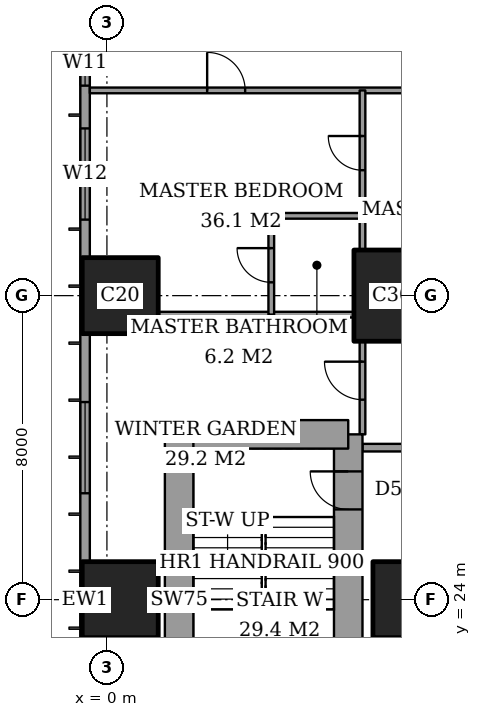
"""IFC4 building model, lengths in metres.
Left out: names, types, materials, properties, quantities, classifications, styles, units other than length and angle.
Written with IfcOpenShell. Run it as: python <this file> out.ifc"""

import sys

from ifc_helpers import new_model, si_unit, direction, frame, frame_2d, origin, origin_2d, place, context, subcontext, project, spatial, rectangle, extrude, element, fill, save


model = new_model("IFC4")
c1 = context("Model", 3, precision=1e-05, world=origin(), true_north=direction((0.0, 1.0)))
c2 = subcontext(c1, "Body", "Model", "MODEL_VIEW")
j1 = project(units=[si_unit("LENGTHUNIT", "METRE"), si_unit("PLANEANGLEUNIT", "RADIAN")], contexts=[c1])
p1 = place(None, origin())
s1 = spatial("IfcSite", under=j1, at=p1, CompositionType="ELEMENT")
p2 = place(p1, origin())
s2 = spatial("IfcBuilding", under=s1, at=p2, CompositionType="ELEMENT")
p3 = place(p2, frame((0.0, 0.0, 157.4)))
s3 = spatial("IfcBuildingStorey", under=s2, at=p3, CompositionType="ELEMENT", Elevation=157.4)
for number, where, z_axis, x_axis in (
    (1, (0.35, 24.0, 0.0), (0.0, 0.0, 1.0), (1.0, 0.0, 0.0)),
    (2, (0.35, 32.0, 0.0), (0.0, 0.0, 1.0), (1.0, 0.0, 0.0)),
    (3, (8.0, 24.0, 0.0), (0.0, 0.0, 1.0), (1.0, 0.0, 0.0)),
):
    element("IfcColumn", number, at=place(p3, frame(where, z_axis=z_axis, x_axis=x_axis)), inside=s3, PredefinedType="COLUMN", context=c2, shape_type="SweptSolid", body=[
        extrude(rectangle(XDim=2.0, YDim=2.0, at=origin_2d()), origin(), (0.0, 0.0, 1.0), 3.6),
    ])
p4 = place(p3, frame((8.0, 32.0, 0.0), z_axis=(0.0, 0.0, 1.0), x_axis=(1.0, 0.0, 0.0)))
e4 = element("IfcColumn", 4, at=p4, inside=s3, PredefinedType="COLUMN", context=c2, shape_type="SweptSolid", body=[
    extrude(rectangle(XDim=3.0, YDim=2.4, at=origin_2d()), origin(), (0.0, 0.0, 1.0), 3.6),
])
p5 = place(p3, frame((6.35, 19.65, 0.0), z_axis=(0.0, 0.0, 1.0), x_axis=(0.0, 1.0, 0.0)))
e5 = element("IfcWall", 5, at=p5, inside=s3, PredefinedType="SHEAR", context=c2, shape_type="SweptSolid", body=[
    extrude(rectangle(XDim=8.7, YDim=0.75, at=frame_2d((4.35, 0.0))), origin(), (0.0, 0.0, 1.0), 3.6),
])
p6 = place(p5, frame((6.725, 0.0, 0.0)))
e6 = element("IfcOpeningElement", 6, at=p6, cuts=e5, PredefinedType="OPENING", context=c2, shape_type="SweptSolid", body=[
    extrude(rectangle(XDim=1.0, YDim=2.1, at=frame_2d((0.5, 1.05))), frame((0.0, 0.385, 0.0), z_axis=(0.0, -1.0, 0.0), x_axis=(1.0, 0.0, 0.0)), (0.0, 0.0, 1.0), 0.77),
])
p7 = place(p3, frame((6.35, 28.35, 0.0), z_axis=(0.0, 0.0, 1.0), x_axis=(-1.0, 0.0, 0.0)))
e7 = element("IfcWall", 7, at=p7, inside=s3, PredefinedType="SHEAR", context=c2, shape_type="SweptSolid", body=[
    extrude(rectangle(XDim=4.45, YDim=0.75, at=frame_2d((2.225, 0.0))), origin(), (0.0, 0.0, 1.0), 3.6),
])
p8 = place(p3, frame((1.9, 28.35, 0.0), z_axis=(0.0, 0.0, 1.0), x_axis=(0.0, -1.0, 0.0)))
e8 = element("IfcWall", 8, at=p8, inside=s3, PredefinedType="SHEAR", context=c2, shape_type="SweptSolid", body=[
    extrude(rectangle(XDim=8.7, YDim=0.75, at=frame_2d((4.35, 0.0))), origin(), (0.0, 0.0, 1.0), 3.6),
])
p9 = place(p3, frame((-0.575, 44.825, 0.0), z_axis=(0.0, 0.0, 1.0), x_axis=(0.0, -1.0, 0.0)))
e9 = element("IfcWall", 9, at=p9, inside=s3, PredefinedType="SOLIDWALL", context=c2, shape_type="SweptSolid", body=[
    extrude(rectangle(XDim=41.65, YDim=0.25, at=frame_2d((20.825, 0.0))), origin(), (0.0, 0.0, 1.0), 3.6),
])
p10 = place(p9, frame((0.775, 0.0, 0.4)))
e10 = element("IfcOpeningElement", 10, at=p10, cuts=e9, PredefinedType="OPENING", context=c2, shape_type="SweptSolid", body=[
    extrude(rectangle(XDim=2.4, YDim=2.2, at=frame_2d((1.2, 1.1))), frame((0.0, 0.135, 0.0), z_axis=(0.0, -1.0, 0.0), x_axis=(1.0, 0.0, 0.0)), (0.0, 0.0, 1.0), 0.27),
])
p11 = place(p9, frame((6.1, 0.0, 0.4)))
e11 = element("IfcOpeningElement", 11, at=p11, cuts=e9, PredefinedType="OPENING", context=c2, shape_type="SweptSolid", body=[
    extrude(rectangle(XDim=1.2, YDim=2.2, at=frame_2d((0.6, 1.1))), frame((0.0, 0.135, 0.0), z_axis=(0.0, -1.0, 0.0), x_axis=(1.0, 0.0, 0.0)), (0.0, 0.0, 1.0), 0.27),
])
p12 = place(p9, frame((8.425, 0.0, 0.4)))
e12 = element("IfcOpeningElement", 12, at=p12, cuts=e9, PredefinedType="OPENING", context=c2, shape_type="SweptSolid", body=[
    extrude(rectangle(XDim=2.4, YDim=2.2, at=frame_2d((1.2, 1.1))), frame((0.0, 0.135, 0.0), z_axis=(0.0, -1.0, 0.0), x_axis=(1.0, 0.0, 0.0)), (0.0, 0.0, 1.0), 0.27),
])
p13 = place(p9, frame((15.625, 0.0, 0.4)))
e13 = element("IfcOpeningElement", 13, at=p13, cuts=e9, PredefinedType="OPENING", context=c2, shape_type="SweptSolid", body=[
    extrude(rectangle(XDim=2.4, YDim=2.2, at=frame_2d((1.2, 1.1))), frame((0.0, 0.135, 0.0), z_axis=(0.0, -1.0, 0.0), x_axis=(1.0, 0.0, 0.0)), (0.0, 0.0, 1.0), 0.27),
])
p14 = place(p9, frame((23.625, 0.0, 0.4)))
e14 = element("IfcOpeningElement", 14, at=p14, cuts=e9, PredefinedType="OPENING", context=c2, shape_type="SweptSolid", body=[
    extrude(rectangle(XDim=2.4, YDim=2.2, at=frame_2d((1.2, 1.1))), frame((0.0, 0.135, 0.0), z_axis=(0.0, -1.0, 0.0), x_axis=(1.0, 0.0, 0.0)), (0.0, 0.0, 1.0), 0.27),
])
p15 = place(p9, frame((30.825, 0.0, 0.4)))
e15 = element("IfcOpeningElement", 15, at=p15, cuts=e9, PredefinedType="OPENING", context=c2, shape_type="SweptSolid", body=[
    extrude(rectangle(XDim=2.4, YDim=2.2, at=frame_2d((1.2, 1.1))), frame((0.0, 0.135, 0.0), z_axis=(0.0, -1.0, 0.0), x_axis=(1.0, 0.0, 0.0)), (0.0, 0.0, 1.0), 0.27),
])
p16 = place(p9, frame((34.5, 0.0, 0.4)))
e16 = element("IfcOpeningElement", 16, at=p16, cuts=e9, PredefinedType="OPENING", context=c2, shape_type="SweptSolid", body=[
    extrude(rectangle(XDim=1.2, YDim=2.2, at=frame_2d((0.6, 1.1))), frame((0.0, 0.135, 0.0), z_axis=(0.0, -1.0, 0.0), x_axis=(1.0, 0.0, 0.0)), (0.0, 0.0, 1.0), 0.27),
])
p17 = place(p9, frame((38.475, 0.0, 0.4)))
e17 = element("IfcOpeningElement", 17, at=p17, cuts=e9, PredefinedType="OPENING", context=c2, shape_type="SweptSolid", body=[
    extrude(rectangle(XDim=2.4, YDim=2.2, at=frame_2d((1.2, 1.1))), frame((0.0, 0.135, 0.0), z_axis=(0.0, -1.0, 0.0), x_axis=(1.0, 0.0, 0.0)), (0.0, 0.0, 1.0), 0.27),
])
p18 = place(p3, frame((6.725, 28.0, 0.0), z_axis=(0.0, 0.0, 1.0), x_axis=(1.0, 0.0, 0.0)))
e18 = element("IfcWall", 18, at=p18, inside=s3, PredefinedType="PARTITIONING", context=c2, shape_type="SweptSolid", body=[
    extrude(rectangle(XDim=17.275, YDim=0.2, at=frame_2d((8.637, 0.0))), origin(), (0.0, 0.0, 1.0), 3.35),
])
p19 = place(p18, frame((6.675, 0.0, 0.0)))
e19 = element("IfcOpeningElement", 19, at=p19, cuts=e18, PredefinedType="OPENING", context=c2, shape_type="SweptSolid", body=[
    extrude(rectangle(XDim=1.2, YDim=2.4, at=frame_2d((0.6, 1.2))), frame((0.0, 0.11, 0.0), z_axis=(0.0, -1.0, 0.0), x_axis=(1.0, 0.0, 0.0)), (0.0, 0.0, 1.0), 0.22),
])
p20 = place(p3, frame((1.35, 31.5, 0.0), z_axis=(0.0, 0.0, 1.0), x_axis=(1.0, 0.0, 0.0)))
e20 = element("IfcWall", 20, at=p20, inside=s3, PredefinedType="PARTITIONING", context=c2, shape_type="SweptSolid", body=[
    extrude(rectangle(XDim=5.15, YDim=0.15, at=frame_2d((2.575, 0.0))), origin(), (0.0, 0.0, 1.0), 3.35),
])
p21 = place(p3, frame((4.325, 34.1, 0.0), z_axis=(0.0, 0.0, 1.0), x_axis=(1.0, 0.0, 0.0)))
e21 = element("IfcWall", 21, at=p21, inside=s3, PredefinedType="PARTITIONING", context=c2, shape_type="SweptSolid", body=[
    extrude(rectangle(XDim=2.4, YDim=0.15, at=frame_2d((1.2, 0.0))), origin(), (0.0, 0.0, 1.0), 3.35),
])
p22 = place(p3, frame((-0.45, 37.4, 0.0), z_axis=(0.0, 0.0, 1.0), x_axis=(1.0, 0.0, 0.0)))
e22 = element("IfcWall", 22, at=p22, inside=s3, PredefinedType="PARTITIONING", context=c2, shape_type="SweptSolid", body=[
    extrude(rectangle(XDim=25.011, YDim=0.15, at=frame_2d((12.505, 0.0))), origin(), (0.0, 0.0, 1.0), 3.35),
])
p23 = place(p22, frame((13.25, 0.0, 0.0)))
e23 = element("IfcOpeningElement", 23, at=p23, cuts=e22, PredefinedType="OPENING", context=c2, shape_type="SweptSolid", body=[
    extrude(rectangle(XDim=1.0, YDim=2.1, at=frame_2d((0.5, 1.05))), frame((0.0, 0.085, 0.0), z_axis=(0.0, -1.0, 0.0), x_axis=(1.0, 0.0, 0.0)), (0.0, 0.0, 1.0), 0.17),
])
p24 = place(p22, frame((3.087, 0.0, 0.0)))
e24 = element("IfcOpeningElement", 24, at=p24, cuts=e22, PredefinedType="OPENING", context=c2, shape_type="SweptSolid", body=[
    extrude(rectangle(XDim=1.0, YDim=2.1, at=frame_2d((0.5, 1.05))), frame((0.0, 0.085, 0.0), z_axis=(0.0, -1.0, 0.0), x_axis=(1.0, 0.0, 0.0)), (0.0, 0.0, 1.0), 0.17),
])
p25 = place(p22, frame((11.05, 0.0, 0.0)))
e25 = element("IfcOpeningElement", 25, at=p25, cuts=e22, PredefinedType="OPENING", context=c2, shape_type="SweptSolid", body=[
    extrude(rectangle(XDim=1.0, YDim=2.1, at=frame_2d((0.5, 1.05))), frame((0.0, 0.085, 0.0), z_axis=(0.0, -1.0, 0.0), x_axis=(1.0, 0.0, 0.0)), (0.0, 0.0, 1.0), 0.17),
])
p26 = place(p22, frame((16.15, 0.0, 0.0)))
e26 = element("IfcOpeningElement", 26, at=p26, cuts=e22, PredefinedType="OPENING", context=c2, shape_type="SweptSolid", body=[
    extrude(rectangle(XDim=1.0, YDim=2.1, at=frame_2d((0.5, 1.05))), frame((0.0, 0.085, 0.0), z_axis=(0.0, -1.0, 0.0), x_axis=(1.0, 0.0, 0.0)), (0.0, 0.0, 1.0), 0.17),
])
p27 = place(p22, frame((21.175, 0.0, 0.0)))
e27 = element("IfcOpeningElement", 27, at=p27, cuts=e22, PredefinedType="OPENING", context=c2, shape_type="SweptSolid", body=[
    extrude(rectangle(XDim=1.0, YDim=2.1, at=frame_2d((0.5, 1.05))), frame((0.0, 0.085, 0.0), z_axis=(0.0, -1.0, 0.0), x_axis=(1.0, 0.0, 0.0)), (0.0, 0.0, 1.0), 0.17),
])
p28 = place(p3, frame((4.325, 31.5, 0.0), z_axis=(0.0, 0.0, 1.0), x_axis=(0.0, 1.0, 0.0)))
e28 = element("IfcWall", 28, at=p28, inside=s3, PredefinedType="PARTITIONING", context=c2, shape_type="SweptSolid", body=[
    extrude(rectangle(XDim=2.6, YDim=0.15, at=frame_2d((1.3, 0.0))), origin(), (0.0, 0.0, 1.0), 3.35),
])
p29 = place(p28, frame((0.85, 0.0, 0.0)))
e29 = element("IfcOpeningElement", 29, at=p29, cuts=e28, PredefinedType="OPENING", context=c2, shape_type="SweptSolid", body=[
    extrude(rectangle(XDim=0.9, YDim=2.1, at=frame_2d((0.45, 1.05))), frame((0.0, 0.085, 0.0), z_axis=(0.0, -1.0, 0.0), x_axis=(1.0, 0.0, 0.0)), (0.0, 0.0, 1.0), 0.17),
])
p30 = place(p3, frame((6.725, 28.35, 0.0), z_axis=(0.0, 0.0, 1.0), x_axis=(0.0, 1.0, 0.0)))
e30 = element("IfcWall", 30, at=p30, inside=s3, PredefinedType="PARTITIONING", context=c2, shape_type="SweptSolid", body=[
    extrude(rectangle(XDim=2.45, YDim=0.15, at=frame_2d((1.225, 0.0))), origin(), (0.0, 0.0, 1.0), 3.35),
])
p31 = place(p30, frame((0.913, 0.0, 0.0)))
e31 = element("IfcOpeningElement", 31, at=p31, cuts=e30, PredefinedType="OPENING", context=c2, shape_type="SweptSolid", body=[
    extrude(rectangle(XDim=1.0, YDim=2.1, at=frame_2d((0.5, 1.05))), frame((0.0, 0.085, 0.0), z_axis=(0.0, -1.0, 0.0), x_axis=(1.0, 0.0, 0.0)), (0.0, 0.0, 1.0), 0.17),
])
p32 = place(p3, frame((6.725, 33.2, 0.0), z_axis=(0.0, 0.0, 1.0), x_axis=(0.0, 1.0, 0.0)))
e32 = element("IfcWall", 32, at=p32, inside=s3, PredefinedType="PARTITIONING", context=c2, shape_type="SweptSolid", body=[
    extrude(rectangle(XDim=4.2, YDim=0.15, at=frame_2d((2.1, 0.0))), origin(), (0.0, 0.0, 1.0), 3.35),
])
p33 = place(p32, frame((2.1, 0.0, 0.0)))
e33 = element("IfcOpeningElement", 33, at=p33, cuts=e32, PredefinedType="OPENING", context=c2, shape_type="SweptSolid", body=[
    extrude(rectangle(XDim=0.9, YDim=2.1, at=frame_2d((0.45, 1.05))), frame((0.0, 0.085, 0.0), z_axis=(0.0, -1.0, 0.0), x_axis=(1.0, 0.0, 0.0)), (0.0, 0.0, 1.0), 0.17),
])
p34 = place(p11, origin())
e34 = element("IfcWindow", 34, at=p34, inside=s3, PartitioningType="SINGLE_PANEL", PredefinedType="WINDOW", context=c2, shape_type="SweptSolid", body=[
    extrude(rectangle(XDim=1.2, YDim=2.2, at=frame_2d((0.6, 1.1))), frame((0.0, 0.03, 0.0), z_axis=(0.0, -1.0, 0.0), x_axis=(1.0, 0.0, 0.0)), (0.0, 0.0, 1.0), 0.06),
])
fill(e11, e34)
p35 = place(p12, origin())
e35 = element("IfcWindow", 35, at=p35, inside=s3, PartitioningType="SINGLE_PANEL", PredefinedType="WINDOW", context=c2, shape_type="SweptSolid", body=[
    extrude(rectangle(XDim=2.4, YDim=2.2, at=frame_2d((1.2, 1.1))), frame((0.0, 0.03, 0.0), z_axis=(0.0, -1.0, 0.0), x_axis=(1.0, 0.0, 0.0)), (0.0, 0.0, 1.0), 0.06),
])
fill(e12, e35)
p36 = place(p13, origin())
e36 = element("IfcWindow", 36, at=p36, inside=s3, PartitioningType="SINGLE_PANEL", PredefinedType="WINDOW", context=c2, shape_type="SweptSolid", body=[
    extrude(rectangle(XDim=2.4, YDim=2.2, at=frame_2d((1.2, 1.1))), frame((0.0, 0.03, 0.0), z_axis=(0.0, -1.0, 0.0), x_axis=(1.0, 0.0, 0.0)), (0.0, 0.0, 1.0), 0.06),
])
fill(e13, e36)
p37 = place(p29, origin())
e37 = element("IfcDoor", 37, at=p37, inside=s3, OperationType="SINGLE_SWING_LEFT", PredefinedType="DOOR", context=c2, shape_type="SweptSolid", body=[
    extrude(rectangle(XDim=0.9, YDim=2.1, at=frame_2d((0.45, 1.05))), frame((0.0, 0.025, 0.0), z_axis=(0.0, -1.0, 0.0), x_axis=(1.0, 0.0, 0.0)), (0.0, 0.0, 1.0), 0.05),
])
fill(e29, e37)
p38 = place(p24, origin())
e38 = element("IfcDoor", 38, at=p38, inside=s3, OperationType="SINGLE_SWING_RIGHT", PredefinedType="DOOR", context=c2, shape_type="SweptSolid", body=[
    extrude(rectangle(XDim=1.0, YDim=2.1, at=frame_2d((0.5, 1.05))), frame((0.0, 0.025, 0.0), z_axis=(0.0, -1.0, 0.0), x_axis=(1.0, 0.0, 0.0)), (0.0, 0.0, 1.0), 0.05),
])
fill(e24, e38)
p39 = place(p31, origin())
e39 = element("IfcDoor", 39, at=p39, inside=s3, OperationType="SINGLE_SWING_LEFT", PredefinedType="DOOR", context=c2, shape_type="SweptSolid", body=[
    extrude(rectangle(XDim=1.0, YDim=2.1, at=frame_2d((0.5, 1.05))), frame((0.0, 0.025, 0.0), z_axis=(0.0, -1.0, 0.0), x_axis=(1.0, 0.0, 0.0)), (0.0, 0.0, 1.0), 0.05),
])
fill(e31, e39)
p40 = place(p33, origin())
e40 = element("IfcDoor", 40, at=p40, inside=s3, OperationType="SINGLE_SWING_LEFT", PredefinedType="DOOR", context=c2, shape_type="SweptSolid", body=[
    extrude(rectangle(XDim=0.9, YDim=2.1, at=frame_2d((0.45, 1.05))), frame((0.0, 0.025, 0.0), z_axis=(0.0, -1.0, 0.0), x_axis=(1.0, 0.0, 0.0)), (0.0, 0.0, 1.0), 0.05),
])
fill(e33, e40)
p41 = place(p6, origin())
e41 = element("IfcDoor", 41, at=p41, inside=s3, OperationType="SINGLE_SWING_LEFT", PredefinedType="DOOR", context=c2, shape_type="SweptSolid", body=[
    extrude(rectangle(XDim=1.0, YDim=2.1, at=frame_2d((0.5, 1.05))), frame((0.0, 0.025, 0.0), z_axis=(0.0, -1.0, 0.0), x_axis=(1.0, 0.0, 0.0)), (0.0, 0.0, 1.0), 0.05),
])
fill(e6, e41)
save(model, sys.argv[1])
